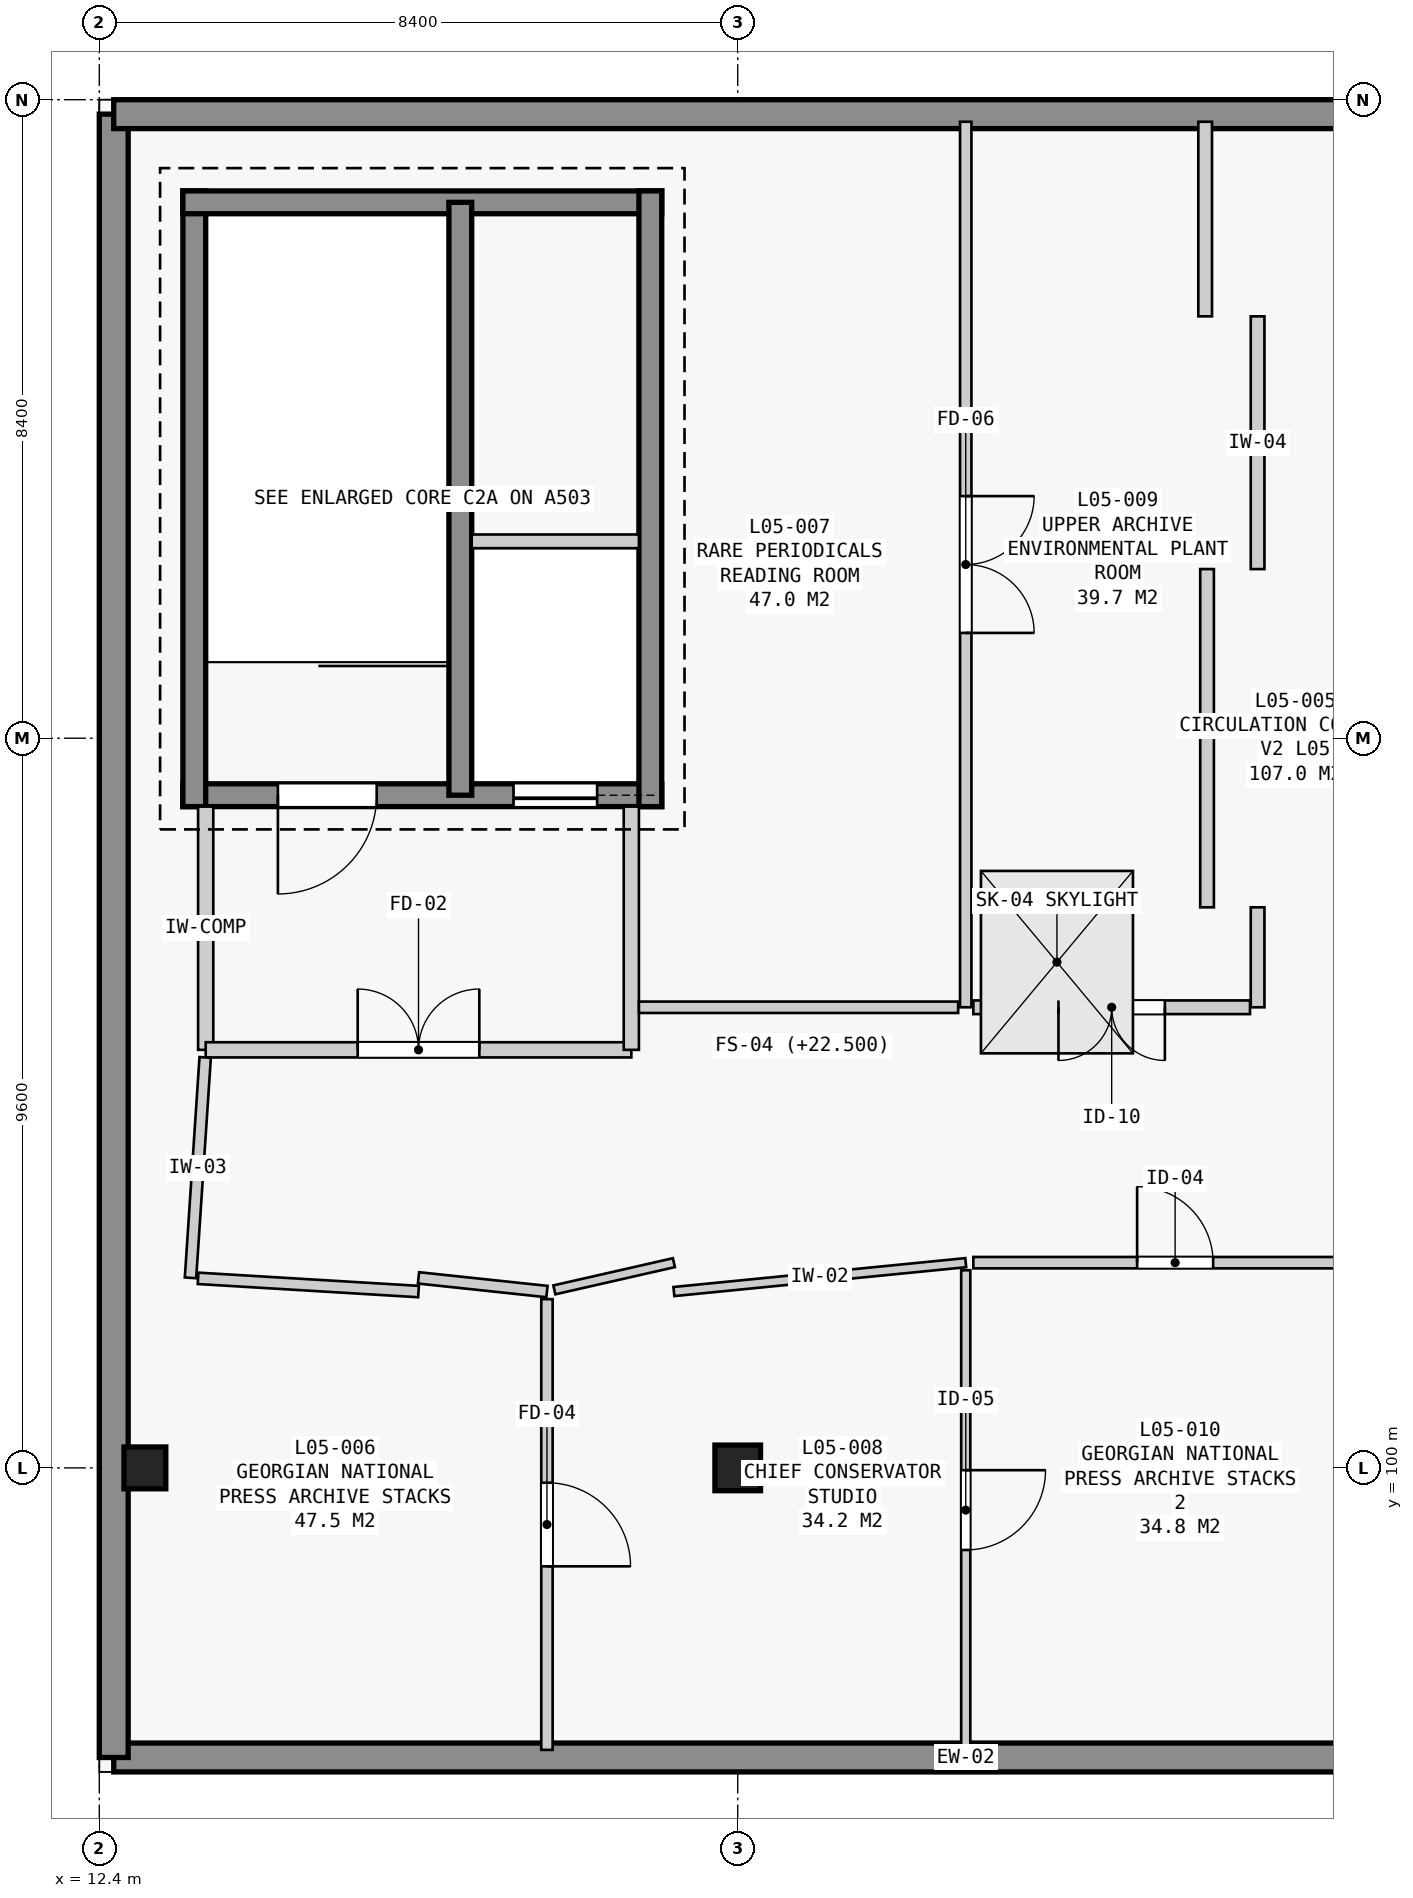
"""IFC4 building model, lengths in metres.
Left out: names, types, materials, properties, quantities, classifications, styles, units other than length and angle.
Written with IfcOpenShell. Run it as: python <this file> out.ifc"""

import sys

from ifc_helpers import new_model, si_unit, direction, frame, frame_2d, origin, origin_2d, place, context, subcontext, project, spatial, rectangle, extrude, element, fill, save


model = new_model("IFC4")
c1 = context("Model", 3, precision=1e-05, world=origin(), true_north=direction((0.0, 1.0)))
c2 = subcontext(c1, "Body", "Model", "MODEL_VIEW")
j1 = project(units=[si_unit("LENGTHUNIT", "METRE"), si_unit("PLANEANGLEUNIT", "RADIAN")], contexts=[c1])
p1 = place(None, origin())
s1 = spatial("IfcSite", under=j1, at=p1, CompositionType="ELEMENT")
p2 = place(p1, origin())
s2 = spatial("IfcBuilding", under=s1, at=p2, CompositionType="ELEMENT")
p3 = place(p2, frame((0.0, 0.0, 22.5)))
s3 = spatial("IfcBuildingStorey", under=s2, at=p3, CompositionType="ELEMENT", Elevation=22.5)
p4 = place(p3, frame((13.0, 100.0, 0.0), z_axis=(0.0, 0.0, 1.0), x_axis=(1.0, 0.0, 0.0)))
e1 = element("IfcColumn", 1, at=p4, inside=s3, PredefinedType="COLUMN", context=c2, shape_type="SweptSolid", body=[
    extrude(rectangle(XDim=0.55, YDim=0.55, at=origin_2d()), origin(), (0.0, 0.0, 1.0), 4.2),
])
p5 = place(p3, frame((20.8, 100.0, 0.0), z_axis=(0.0, 0.0, 1.0), x_axis=(1.0, 0.0, 0.0)))
e2 = element("IfcColumn", 2, at=p5, inside=s3, PredefinedType="COLUMN", context=c2, shape_type="SweptSolid", body=[
    extrude(rectangle(XDim=0.6, YDim=0.6, at=origin_2d()), origin(), (0.0, 0.0, 1.0), 4.2),
])
p6 = place(p3, frame((35.01, 96.19, 0.0), z_axis=(0.0, 0.0, 1.0), x_axis=(-1.0, 0.0, 0.0)))
e3 = element("IfcWall", 3, at=p6, inside=s3, PredefinedType="STANDARD", context=c2, shape_type="SweptSolid", body=[
    extrude(rectangle(XDim=22.42, YDim=0.38, at=frame_2d((11.21, 0.0))), origin(), (0.0, 0.0, 1.0), 3.94),
])
p7 = place(p3, frame((12.59, 96.19, 0.0), z_axis=(0.0, 0.0, 1.0), x_axis=(0.0, 1.0, 0.0)))
e4 = element("IfcWall", 4, at=p7, inside=s3, PredefinedType="STANDARD", context=c2, shape_type="SweptSolid", body=[
    extrude(rectangle(XDim=21.62, YDim=0.38, at=frame_2d((10.81, 0.0))), origin(), (0.0, 0.0, 1.0), 3.94),
])
p8 = place(p3, frame((12.59, 117.81, 0.0), z_axis=(0.0, 0.0, 1.0), x_axis=(1.0, 0.0, 0.0)))
e5 = element("IfcWall", 5, at=p8, inside=s3, PredefinedType="STANDARD", context=c2, shape_type="SweptSolid", body=[
    extrude(rectangle(XDim=22.42, YDim=0.38, at=frame_2d((11.21, 0.0))), origin(), (0.0, 0.0, 1.0), 3.94),
])
p9 = place(p3, frame((19.8, 108.85, 0.0), z_axis=(0.0, 0.0, 1.0), x_axis=(-1.0, 0.0, 0.0)))
e6 = element("IfcWall", 6, at=p9, inside=s3, PredefinedType="SHEAR", context=c2, shape_type="SweptSolid", body=[
    extrude(rectangle(XDim=6.3, YDim=0.3, at=frame_2d((3.15, 0.0))), origin(), (0.0, 0.0, 1.0), 4.2),
])
p10 = place(p9, frame((3.75, 0.0, 0.0)))
e7 = element("IfcOpeningElement", 7, at=p10, cuts=e6, PredefinedType="OPENING", context=c2, shape_type="SweptSolid", body=[
    extrude(rectangle(XDim=1.3, YDim=2.2, at=frame_2d((0.65, 1.1))), frame((0.0, 0.16, 0.0), z_axis=(0.0, -1.0, 0.0), x_axis=(1.0, 0.0, 0.0)), (0.0, 0.0, 1.0), 0.32),
])
p11 = place(p9, frame((0.85, 0.0, 0.0)))
e8 = element("IfcOpeningElement", 8, at=p11, cuts=e6, PredefinedType="OPENING", context=c2, shape_type="SweptSolid", body=[
    extrude(rectangle(XDim=1.1, YDim=2.15, at=frame_2d((0.55, 1.075))), frame((0.0, 0.16, 0.0), z_axis=(0.0, -1.0, 0.0), x_axis=(1.0, 0.0, 0.0)), (0.0, 0.0, 1.0), 0.32),
])
p12 = place(p3, frame((13.65, 108.7, 0.0), z_axis=(0.0, 0.0, 1.0), x_axis=(0.0, 1.0, 0.0)))
e9 = element("IfcWall", 9, at=p12, inside=s3, PredefinedType="SHEAR", context=c2, shape_type="SweptSolid", body=[
    extrude(rectangle(XDim=8.1, YDim=0.3, at=frame_2d((4.05, 0.0))), origin(), (0.0, 0.0, 1.0), 4.2),
])
p13 = place(p3, frame((13.5, 116.65, 0.0), z_axis=(0.0, 0.0, 1.0), x_axis=(1.0, 0.0, 0.0)))
e10 = element("IfcWall", 10, at=p13, inside=s3, PredefinedType="SHEAR", context=c2, shape_type="SweptSolid", body=[
    extrude(rectangle(XDim=6.3, YDim=0.3, at=frame_2d((3.15, 0.0))), origin(), (0.0, 0.0, 1.0), 4.2),
])
p14 = place(p3, frame((19.65, 116.8, 0.0), z_axis=(0.0, 0.0, 1.0), x_axis=(0.0, -1.0, 0.0)))
e11 = element("IfcWall", 11, at=p14, inside=s3, PredefinedType="SHEAR", context=c2, shape_type="SweptSolid", body=[
    extrude(rectangle(XDim=8.1, YDim=0.3, at=frame_2d((4.05, 0.0))), origin(), (0.0, 0.0, 1.0), 4.2),
])
p15 = place(p3, frame((17.15, 108.85, 0.0), z_axis=(0.0, 0.0, 1.0), x_axis=(0.0, 1.0, 0.0)))
e12 = element("IfcWall", 12, at=p15, inside=s3, PredefinedType="SHEAR", context=c2, shape_type="SweptSolid", body=[
    extrude(rectangle(XDim=7.8, YDim=0.3, at=frame_2d((3.9, 0.0))), origin(), (0.0, 0.0, 1.0), 4.2),
])
p16 = place(p3, frame((17.3, 112.19, 0.0), z_axis=(0.0, 0.0, 1.0), x_axis=(1.0, 0.0, 0.0)))
e13 = element("IfcWall", 13, at=p16, inside=s3, PredefinedType="PARTITIONING", context=c2, shape_type="SweptSolid", body=[
    extrude(rectangle(XDim=2.2, YDim=0.18, at=frame_2d((1.1, 0.0))), origin(), (0.0, 0.0, 1.0), 4.2),
])
p17 = place(p3, frame((13.8, 108.7, 0.0), z_axis=(0.0, 0.0, 1.0), x_axis=(0.0, -1.0, 0.0)))
e14 = element("IfcWall", 14, at=p17, inside=s3, PredefinedType="STANDARD", context=c2, shape_type="SweptSolid", body=[
    extrude(rectangle(XDim=3.2, YDim=0.2, at=frame_2d((1.6, 0.0))), origin(), (0.0, 0.0, 1.0), 4.2),
])
p18 = place(p3, frame((13.8, 105.5, 0.0), z_axis=(0.0, 0.0, 1.0), x_axis=(1.0, 0.0, 0.0)))
e15 = element("IfcWall", 15, at=p18, inside=s3, PredefinedType="STANDARD", context=c2, shape_type="SweptSolid", body=[
    extrude(rectangle(XDim=5.6, YDim=0.2, at=frame_2d((2.8, 0.0))), origin(), (0.0, 0.0, 1.0), 4.2),
])
p19 = place(p18, frame((2.0, 0.0, 0.0)))
e16 = element("IfcOpeningElement", 16, at=p19, cuts=e15, PredefinedType="OPENING", context=c2, shape_type="SweptSolid", body=[
    extrude(rectangle(XDim=1.6, YDim=2.2, at=frame_2d((0.8, 1.1))), frame((0.0, 0.11, 0.0), z_axis=(0.0, -1.0, 0.0), x_axis=(1.0, 0.0, 0.0)), (0.0, 0.0, 1.0), 0.22),
])
p20 = place(p3, frame((19.4, 105.5, 0.0), z_axis=(0.0, 0.0, 1.0), x_axis=(0.0, 1.0, 0.0)))
e17 = element("IfcWall", 17, at=p20, inside=s3, PredefinedType="STANDARD", context=c2, shape_type="SweptSolid", body=[
    extrude(rectangle(XDim=3.2, YDim=0.2, at=frame_2d((1.6, 0.0))), origin(), (0.0, 0.0, 1.0), 4.2),
])
p21 = place(p3, frame((13.793, 105.4, 0.0), z_axis=(0.0, 0.0, 1.0), x_axis=(-0.066440960793, -0.997790358106, 0.0)))
e18 = element("IfcWall", 18, at=p21, inside=s3, PredefinedType="PARTITIONING", context=c2, shape_type="SweptSolid", body=[
    extrude(rectangle(XDim=2.906, YDim=0.15, at=frame_2d((1.453, 0.0))), origin(), (0.0, 0.0, 1.0), 3.94),
])
p22 = place(p3, frame((13.7, 102.494, 0.0), z_axis=(0.0, 0.0, 1.0), x_axis=(0.998208861918, -0.059825312263, 0.0)))
e19 = element("IfcWall", 19, at=p22, inside=s3, PredefinedType="PARTITIONING", context=c2, shape_type="SweptSolid", body=[
    extrude(rectangle(XDim=2.906, YDim=0.15, at=frame_2d((1.453, 0.0))), origin(), (0.0, 0.0, 1.0), 3.94),
])
p23 = place(p3, frame((16.6, 102.5, 0.0), z_axis=(0.0, 0.0, 1.0), x_axis=(0.994379585248, -0.105873700423, 0.0)))
e20 = element("IfcWall", 20, at=p23, inside=s3, PredefinedType="PARTITIONING", context=c2, shape_type="SweptSolid", body=[
    extrude(rectangle(XDim=1.699, YDim=0.15, at=frame_2d((0.85, 0.0))), origin(), (0.0, 0.0, 1.0), 3.94),
])
p24 = place(p3, frame((18.29, 102.22, 0.0), z_axis=(0.0, 0.0, 1.0), x_axis=(0.0, -1.0, 0.0)))
e21 = element("IfcWall", 21, at=p24, inside=s3, PredefinedType="PARTITIONING", context=c2, shape_type="SweptSolid", body=[
    extrude(rectangle(XDim=5.93, YDim=0.15, at=frame_2d((2.965, 0.0))), origin(), (0.0, 0.0, 1.0), 3.12),
])
p25 = place(p24, frame((2.415, 0.0, 0.0)))
e22 = element("IfcOpeningElement", 22, at=p25, cuts=e21, PredefinedType="OPENING", context=c2, shape_type="SweptSolid", body=[
    extrude(rectangle(XDim=1.1, YDim=2.15, at=frame_2d((0.55, 1.075))), frame((0.0, 0.085, 0.0), z_axis=(0.0, -1.0, 0.0), x_axis=(1.0, 0.0, 0.0)), (0.0, 0.0, 1.0), 0.17),
])
p26 = place(p3, frame((23.8, 117.71, 0.0), z_axis=(0.0, 0.0, 1.0), x_axis=(0.0, -1.0, 0.0)))
e23 = element("IfcWall", 23, at=p26, inside=s3, PredefinedType="PARTITIONING", context=c2, shape_type="SweptSolid", body=[
    extrude(rectangle(XDim=11.65, YDim=0.15, at=frame_2d((5.825, 0.0))), origin(), (0.0, 0.0, 1.0), 3.94),
])
p27 = place(p26, frame((4.925, 0.0, 0.0)))
e24 = element("IfcOpeningElement", 24, at=p27, cuts=e23, PredefinedType="OPENING", context=c2, shape_type="SweptSolid", body=[
    extrude(rectangle(XDim=1.8, YDim=2.2, at=frame_2d((0.9, 1.1))), frame((0.0, 0.085, 0.0), z_axis=(0.0, -1.0, 0.0), x_axis=(1.0, 0.0, 0.0)), (0.0, 0.0, 1.0), 0.17),
])
p28 = place(p3, frame((23.7, 106.06, 0.0), z_axis=(0.0, 0.0, 1.0), x_axis=(-1.0, 0.0, 0.0)))
e25 = element("IfcWall", 25, at=p28, inside=s3, PredefinedType="PARTITIONING", context=c2, shape_type="SweptSolid", body=[
    extrude(rectangle(XDim=4.2, YDim=0.15, at=frame_2d((2.1, 0.0))), origin(), (0.0, 0.0, 1.0), 3.94),
])
p29 = place(p3, frame((19.96, 102.32, 0.0), z_axis=(0.0, 0.0, 1.0), x_axis=(0.995142491343, 0.098445019806, 0.0)))
e26 = element("IfcWall", 26, at=p29, inside=s3, PredefinedType="PARTITIONING", context=c2, shape_type="SweptSolid", body=[
    extrude(rectangle(XDim=3.859, YDim=0.12, at=frame_2d((1.929, 0.0))), origin(), (0.0, 0.0, 1.0), 3.94),
])
p30 = place(p3, frame((23.8, 102.6, 0.0), z_axis=(0.0, 0.0, 1.0), x_axis=(0.0, -1.0, 0.0)))
e27 = element("IfcWall", 27, at=p30, inside=s3, PredefinedType="PARTITIONING", context=c2, shape_type="SweptSolid", body=[
    extrude(rectangle(XDim=6.31, YDim=0.12, at=frame_2d((3.155, 0.0))), origin(), (0.0, 0.0, 1.0), 3.07),
])
p31 = place(p30, frame((2.63, 0.0, 0.0)))
e28 = element("IfcOpeningElement", 28, at=p31, cuts=e27, PredefinedType="OPENING", context=c2, shape_type="SweptSolid", body=[
    extrude(rectangle(XDim=1.05, YDim=2.15, at=frame_2d((0.525, 1.075))), frame((0.0, 0.07, 0.0), z_axis=(0.0, -1.0, 0.0), x_axis=(1.0, 0.0, 0.0)), (0.0, 0.0, 1.0), 0.14),
])
p32 = place(p3, frame((18.387, 102.342, 0.0), z_axis=(0.0, 0.0, 1.0), x_axis=(0.975095664059, 0.221784683721, 0.0)))
e29 = element("IfcWall", 29, at=p32, inside=s3, PredefinedType="PARTITIONING", context=c2, shape_type="SweptSolid", body=[
    extrude(rectangle(XDim=1.613, YDim=0.12, at=frame_2d((0.806, 0.0))), origin(), (0.0, 0.0, 1.0), 3.94),
])
p33 = place(p3, frame((26.95, 117.71, 0.0), z_axis=(0.0, 0.0, 1.0), x_axis=(0.0, -1.0, 0.0)))
e30 = element("IfcWall", 30, at=p33, inside=s3, PredefinedType="PARTITIONING", context=c2, shape_type="SweptSolid", body=[
    extrude(rectangle(XDim=2.56, YDim=0.18, at=frame_2d((1.28, 0.0))), origin(), (0.0, 0.0, 1.0), 3.94),
])
p34 = place(p3, frame((27.64, 115.15, 0.0), z_axis=(0.0, 0.0, 1.0), x_axis=(0.0, -1.0, 0.0)))
e31 = element("IfcWall", 31, at=p34, inside=s3, PredefinedType="PARTITIONING", context=c2, shape_type="SweptSolid", body=[
    extrude(rectangle(XDim=3.325, YDim=0.18, at=frame_2d((1.663, 0.0))), origin(), (0.0, 0.0, 1.0), 3.94),
])
p35 = place(p3, frame((26.975, 111.825, 0.0), z_axis=(0.0, 0.0, 1.0), x_axis=(0.0, -1.0, 0.0)))
e32 = element("IfcWall", 32, at=p35, inside=s3, PredefinedType="PARTITIONING", context=c2, shape_type="SweptSolid", body=[
    extrude(rectangle(XDim=4.45, YDim=0.18, at=frame_2d((2.225, 0.0))), origin(), (0.0, 0.0, 1.0), 3.94),
])
p36 = place(p3, frame((27.64, 107.375, 0.0), z_axis=(0.0, 0.0, 1.0), x_axis=(0.0, -1.0, 0.0)))
e33 = element("IfcWall", 33, at=p36, inside=s3, PredefinedType="PARTITIONING", context=c2, shape_type="SweptSolid", body=[
    extrude(rectangle(XDim=1.315, YDim=0.18, at=frame_2d((0.657, 0.0))), origin(), (0.0, 0.0, 1.0), 3.94),
])
p37 = place(p3, frame((27.54, 106.06, 0.0), z_axis=(0.0, 0.0, 1.0), x_axis=(-1.0, 0.0, 0.0)))
e34 = element("IfcWall", 34, at=p37, inside=s3, PredefinedType="PARTITIONING", context=c2, shape_type="SweptSolid", body=[
    extrude(rectangle(XDim=3.64, YDim=0.18, at=frame_2d((1.82, 0.0))), origin(), (0.0, 0.0, 1.0), 3.94),
])
p38 = place(p37, frame((1.12, 0.0, 0.0)))
e35 = element("IfcOpeningElement", 35, at=p38, cuts=e34, PredefinedType="OPENING", context=c2, shape_type="SweptSolid", body=[
    extrude(rectangle(XDim=1.4, YDim=2.2, at=frame_2d((0.7, 1.1))), frame((0.0, 0.1, 0.0), z_axis=(0.0, -1.0, 0.0), x_axis=(1.0, 0.0, 0.0)), (0.0, 0.0, 1.0), 0.2),
])
p39 = place(p3, frame((23.9, 102.7, 0.0), z_axis=(0.0, 0.0, 1.0), x_axis=(1.0, 0.0, 0.0)))
e36 = element("IfcWall", 36, at=p39, inside=s3, PredefinedType="PARTITIONING", context=c2, shape_type="SweptSolid", body=[
    extrude(rectangle(XDim=5.31, YDim=0.15, at=frame_2d((2.655, 0.0))), origin(), (0.0, 0.0, 1.0), 3.17),
])
p40 = place(p39, frame((2.155, 0.0, 0.0)))
e37 = element("IfcOpeningElement", 37, at=p40, cuts=e36, PredefinedType="OPENING", context=c2, shape_type="SweptSolid", body=[
    extrude(rectangle(XDim=1.0, YDim=2.15, at=frame_2d((0.5, 1.075))), frame((0.0, 0.085, 0.0), z_axis=(0.0, -1.0, 0.0), x_axis=(1.0, 0.0, 0.0)), (0.0, 0.0, 1.0), 0.17),
])
p41 = place(p2, frame((0.0, 0.0, 26.7)))
p42 = place(p41, frame((0.0, 0.0, -0.26)))
p43 = place(p42, frame((25.0, 106.654, 0.0)))
p44 = place(p43, frame((0.0, 0.0, 0.21)))
e38 = element("IfcWindow", 38, at=p44, inside=s3, PartitioningType="SINGLE_PANEL", PredefinedType="SKYLIGHT", context=c2, shape_type="SweptSolid", body=[
    extrude(rectangle(XDim=2.0, YDim=2.4, at=origin_2d()), origin(), (0.0, 0.0, 1.0), 0.05),
])
p45 = place(p10, origin())
e39 = element("IfcDoor", 39, at=p45, inside=s3, OperationType="SINGLE_SWING_RIGHT", PredefinedType="DOOR", context=c2, shape_type="SweptSolid", body=[
    extrude(rectangle(XDim=1.3, YDim=2.2, at=frame_2d((0.65, 1.1))), frame((0.0, 0.025, 0.0), z_axis=(0.0, -1.0, 0.0), x_axis=(1.0, 0.0, 0.0)), (0.0, 0.0, 1.0), 0.05),
])
fill(e7, e39)
p46 = place(p11, origin())
e40 = element("IfcDoor", 40, at=p46, inside=s3, OperationType="SLIDING_TO_LEFT", PredefinedType="DOOR", context=c2, shape_type="SweptSolid", body=[
    extrude(rectangle(XDim=1.1, YDim=2.15, at=frame_2d((0.55, 1.075))), frame((0.0, 0.025, 0.0), z_axis=(0.0, -1.0, 0.0), x_axis=(1.0, 0.0, 0.0)), (0.0, 0.0, 1.0), 0.05),
])
fill(e8, e40)
p47 = place(p19, origin())
e41 = element("IfcDoor", 41, at=p47, inside=s3, OperationType="DOUBLE_DOOR_SINGLE_SWING", PredefinedType="DOOR", context=c2, shape_type="SweptSolid", body=[
    extrude(rectangle(XDim=1.6, YDim=2.2, at=frame_2d((0.8, 1.1))), frame((0.0, 0.025, 0.0), z_axis=(0.0, -1.0, 0.0), x_axis=(1.0, 0.0, 0.0)), (0.0, 0.0, 1.0), 0.05),
])
fill(e16, e41)
p48 = place(p25, origin())
e42 = element("IfcDoor", 42, at=p48, inside=s3, OperationType="SINGLE_SWING_RIGHT", PredefinedType="DOOR", context=c2, shape_type="SweptSolid", body=[
    extrude(rectangle(XDim=1.1, YDim=2.15, at=frame_2d((0.55, 1.075))), frame((0.0, 0.025, 0.0), z_axis=(0.0, -1.0, 0.0), x_axis=(1.0, 0.0, 0.0)), (0.0, 0.0, 1.0), 0.05),
])
fill(e22, e42)
p49 = place(p27, origin())
e43 = element("IfcDoor", 43, at=p49, inside=s3, OperationType="DOUBLE_DOOR_SINGLE_SWING", PredefinedType="DOOR", context=c2, shape_type="SweptSolid", body=[
    extrude(rectangle(XDim=1.8, YDim=2.2, at=frame_2d((0.9, 1.1))), frame((0.0, 0.025, 0.0), z_axis=(0.0, -1.0, 0.0), x_axis=(1.0, 0.0, 0.0)), (0.0, 0.0, 1.0), 0.05),
])
fill(e24, e43)
p50 = place(p31, origin())
e44 = element("IfcDoor", 44, at=p50, inside=s3, OperationType="SINGLE_SWING_LEFT", PredefinedType="DOOR", context=c2, shape_type="SweptSolid", body=[
    extrude(rectangle(XDim=1.05, YDim=2.15, at=frame_2d((0.525, 1.075))), frame((0.0, 0.025, 0.0), z_axis=(0.0, -1.0, 0.0), x_axis=(1.0, 0.0, 0.0)), (0.0, 0.0, 1.0), 0.05),
])
fill(e28, e44)
p51 = place(p38, origin())
e45 = element("IfcDoor", 45, at=p51, inside=s3, OperationType="DOUBLE_DOOR_SINGLE_SWING", PredefinedType="DOOR", context=c2, shape_type="SweptSolid", body=[
    extrude(rectangle(XDim=1.4, YDim=2.2, at=frame_2d((0.7, 1.1))), frame((0.0, 0.025, 0.0), z_axis=(0.0, -1.0, 0.0), x_axis=(1.0, 0.0, 0.0)), (0.0, 0.0, 1.0), 0.05),
])
fill(e35, e45)
p52 = place(p40, origin())
e46 = element("IfcDoor", 46, at=p52, inside=s3, OperationType="SINGLE_SWING_LEFT", PredefinedType="DOOR", context=c2, shape_type="SweptSolid", body=[
    extrude(rectangle(XDim=1.0, YDim=2.15, at=frame_2d((0.5, 1.075))), frame((0.0, 0.025, 0.0), z_axis=(0.0, -1.0, 0.0), x_axis=(1.0, 0.0, 0.0)), (0.0, 0.0, 1.0), 0.05),
])
fill(e37, e46)
save(model, sys.argv[1])
